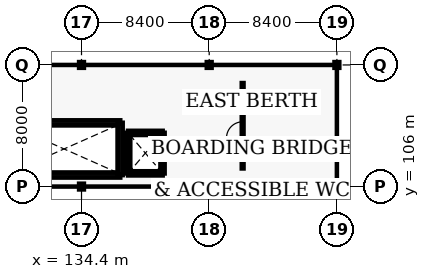
"""IFC4 building model, lengths in metres.
Left out: names, types, materials, properties, quantities, classifications, styles, units other than length and angle.
Written with IfcOpenShell. Run it as: python <this file> out.ifc"""

import sys

from ifc_helpers import new_model, si_unit, direction, frame, frame_2d, origin, origin_2d, place, context, subcontext, project, spatial, rectangle, i_section, extrude, element, fill, save


model = new_model("IFC4")
c1 = context("Model", 3, precision=1e-05, world=origin(), true_north=direction((0.0, 1.0)))
c2 = subcontext(c1, "Body", "Model", "MODEL_VIEW")
j1 = project(units=[si_unit("LENGTHUNIT", "METRE"), si_unit("PLANEANGLEUNIT", "RADIAN")], contexts=[c1])
p1 = place(None, origin())
s1 = spatial("IfcSite", under=j1, at=p1, CompositionType="ELEMENT")
p2 = place(p1, origin())
s2 = spatial("IfcBuilding", under=s1, at=p2, CompositionType="ELEMENT")
p3 = place(p2, frame((0.0, 0.0, 5.44)))
s3 = spatial("IfcBuildingStorey", under=s2, at=p3, CompositionType="ELEMENT", Elevation=5.44)
p4 = place(p3, frame((134.4, 106.0, 0.0), z_axis=(0.0, 0.0, 1.0), x_axis=(1.0, 0.0, 0.0)))
e1 = element("IfcColumn", 1, at=p4, inside=s3, PredefinedType="COLUMN", context=c2, shape_type="SweptSolid", body=[
    extrude(i_section(OverallWidth=0.3, OverallDepth=0.36, WebThickness=0.012, FlangeThickness=0.022, FilletRadius=0.027, at=origin_2d()), origin(), (0.0, 0.0, 1.0), 3.84),
])
p5 = place(p3, frame((134.4, 114.0, 0.0), z_axis=(0.0, 0.0, 1.0), x_axis=(1.0, 0.0, 0.0)))
e2 = element("IfcColumn", 2, at=p5, inside=s3, PredefinedType="COLUMN", context=c2, shape_type="SweptSolid", body=[
    extrude(i_section(OverallWidth=0.3, OverallDepth=0.36, WebThickness=0.012, FlangeThickness=0.022, FilletRadius=0.027, at=origin_2d()), origin(), (0.0, 0.0, 1.0), 5.468),
])
p6 = place(p3, frame((142.8, 106.0, 0.0), z_axis=(0.0, 0.0, 1.0), x_axis=(1.0, 0.0, 0.0)))
e3 = element("IfcColumn", 3, at=p6, inside=s3, PredefinedType="COLUMN", context=c2, shape_type="SweptSolid", body=[
    extrude(i_section(OverallWidth=0.3, OverallDepth=0.36, WebThickness=0.012, FlangeThickness=0.022, FilletRadius=0.027, at=origin_2d()), origin(), (0.0, 0.0, 1.0), 3.84),
])
p7 = place(p3, frame((142.8, 114.0, 0.0), z_axis=(0.0, 0.0, 1.0), x_axis=(1.0, 0.0, 0.0)))
e4 = element("IfcColumn", 4, at=p7, inside=s3, PredefinedType="COLUMN", context=c2, shape_type="SweptSolid", body=[
    extrude(i_section(OverallWidth=0.3, OverallDepth=0.36, WebThickness=0.012, FlangeThickness=0.022, FilletRadius=0.027, at=origin_2d()), origin(), (0.0, 0.0, 1.0), 5.468),
])
p8 = place(p3, frame((151.2, 106.0, 0.0), z_axis=(0.0, 0.0, 1.0), x_axis=(1.0, 0.0, 0.0)))
e5 = element("IfcColumn", 5, at=p8, inside=s3, PredefinedType="COLUMN", context=c2, shape_type="SweptSolid", body=[
    extrude(i_section(OverallWidth=0.3, OverallDepth=0.36, WebThickness=0.012, FlangeThickness=0.022, FilletRadius=0.027, at=origin_2d()), origin(), (0.0, 0.0, 1.0), 3.84),
])
p9 = place(p3, frame((151.2, 114.0, 0.0), z_axis=(0.0, 0.0, 1.0), x_axis=(1.0, 0.0, 0.0)))
e6 = element("IfcColumn", 6, at=p9, inside=s3, PredefinedType="COLUMN", context=c2, shape_type="SweptSolid", body=[
    extrude(i_section(OverallWidth=0.3, OverallDepth=0.36, WebThickness=0.012, FlangeThickness=0.022, FilletRadius=0.027, at=origin_2d()), origin(), (0.0, 0.0, 1.0), 5.468),
])
for number, where, z_axis, x_axis in (
    (7, (128.06, 106.76, 0.0), (0.0, 0.0, 1.0), (1.0, 0.0, 0.0)),
    (8, (128.06, 110.19, 0.0), (0.0, 0.0, 1.0), (1.0, 0.0, 0.0)),
):
    element("IfcWall", number, at=place(p3, frame(where, z_axis=z_axis, x_axis=x_axis)), inside=s3, PredefinedType="SHEAR", context=c2, shape_type="SweptSolid", body=[
        extrude(rectangle(XDim=8.88, YDim=0.32, at=frame_2d((4.44, 0.0))), origin(), (0.0, 0.0, 1.0), 3.98),
    ])
p10 = place(p3, frame((136.94, 106.76, 0.0), z_axis=(0.0, 0.0, 1.0), x_axis=(0.0, 1.0, 0.0)))
e9 = element("IfcWall", 9, at=p10, inside=s3, PredefinedType="SHEAR", context=c2, shape_type="SweptSolid", body=[
    extrude(rectangle(XDim=3.43, YDim=0.32, at=frame_2d((1.715, 0.0))), origin(), (0.0, 0.0, 1.0), 3.98),
])
p11 = place(p3, frame((137.47, 106.87, 0.0), z_axis=(0.0, 0.0, 1.0), x_axis=(1.0, 0.0, 0.0)))
e10 = element("IfcWall", 10, at=p11, inside=s3, PredefinedType="SHEAR", context=c2, shape_type="SweptSolid", body=[
    extrude(rectangle(XDim=2.26, YDim=0.26, at=frame_2d((1.13, 0.0))), origin(), (0.0, 0.0, 1.0), 3.98),
])
for number, where, z_axis, x_axis in (
    (11, (139.73, 106.87, 0.0), (0.0, 0.0, 1.0), (0.0, 1.0, 0.0)),
    (12, (137.47, 109.53, 0.0), (0.0, 0.0, 1.0), (0.0, -1.0, 0.0)),
):
    element("IfcWall", number, at=place(p3, frame(where, z_axis=z_axis, x_axis=x_axis)), inside=s3, PredefinedType="SHEAR", context=c2, shape_type="SweptSolid", body=[
        extrude(rectangle(XDim=2.66, YDim=0.26, at=frame_2d((1.33, 0.0))), origin(), (0.0, 0.0, 1.0), 3.98),
    ])
p12 = place(p3, frame((137.47, 109.53, 0.0), z_axis=(0.0, 0.0, 1.0), x_axis=(1.0, 0.0, 0.0)))
e13 = element("IfcWall", 13, at=p12, inside=s3, PredefinedType="SHEAR", context=c2, shape_type="SweptSolid", body=[
    extrude(rectangle(XDim=2.26, YDim=0.26, at=frame_2d((1.13, 0.0))), origin(), (0.0, 0.0, 1.0), 3.98),
])
p13 = place(p12, frame((0.51, 0.0, 0.0)))
e14 = element("IfcOpeningElement", 14, at=p13, cuts=e13, PredefinedType="OPENING", context=c2, shape_type="SweptSolid", body=[
    extrude(rectangle(XDim=1.24, YDim=2.14, at=frame_2d((0.62, 1.07))), frame((0.0, 0.14, 0.0), z_axis=(0.0, -1.0, 0.0), x_axis=(1.0, 0.0, 0.0)), (0.0, 0.0, 1.0), 0.28),
])
p14 = place(p3, frame((145.0, 107.2, 0.0), z_axis=(0.0, 0.0, 1.0), x_axis=(0.0, 1.0, 0.0)))
e15 = element("IfcWall", 15, at=p14, inside=s3, PredefinedType="PARTITIONING", context=c2, shape_type="SweptSolid", body=[
    extrude(rectangle(XDim=5.6, YDim=0.1, at=frame_2d((2.8, 0.0))), origin(), (0.0, 0.0, 1.0), 2.8),
])
p15 = place(p14, frame((2.0, 0.0, 0.0)))
e16 = element("IfcOpeningElement", 16, at=p15, cuts=e15, PredefinedType="OPENING", context=c2, shape_type="SweptSolid", body=[
    extrude(rectangle(XDim=1.06, YDim=2.1, at=frame_2d((0.53, 1.05))), frame((0.0, 0.06, 0.0), z_axis=(0.0, -1.0, 0.0), x_axis=(1.0, 0.0, 0.0)), (0.0, 0.0, 1.0), 0.12),
])
p16 = place(p13, origin())
e17 = element("IfcDoor", 17, at=p16, inside=s3, OperationType="DOUBLE_DOOR_SLIDING", PredefinedType="DOOR", context=c2, shape_type="SweptSolid", body=[
    extrude(rectangle(XDim=1.24, YDim=2.14, at=frame_2d((0.62, 1.07))), frame((0.0, 0.025, 0.0), z_axis=(0.0, -1.0, 0.0), x_axis=(1.0, 0.0, 0.0)), (0.0, 0.0, 1.0), 0.05),
])
fill(e14, e17)
p17 = place(p15, origin())
e18 = element("IfcDoor", 18, at=p17, inside=s3, OperationType="SINGLE_SWING_LEFT", PredefinedType="DOOR", context=c2, shape_type="SweptSolid", body=[
    extrude(rectangle(XDim=1.06, YDim=2.1, at=frame_2d((0.53, 1.05))), frame((0.0, 0.025, 0.0), z_axis=(0.0, -1.0, 0.0), x_axis=(1.0, 0.0, 0.0)), (0.0, 0.0, 1.0), 0.05),
])
fill(e16, e18)
save(model, sys.argv[1])
